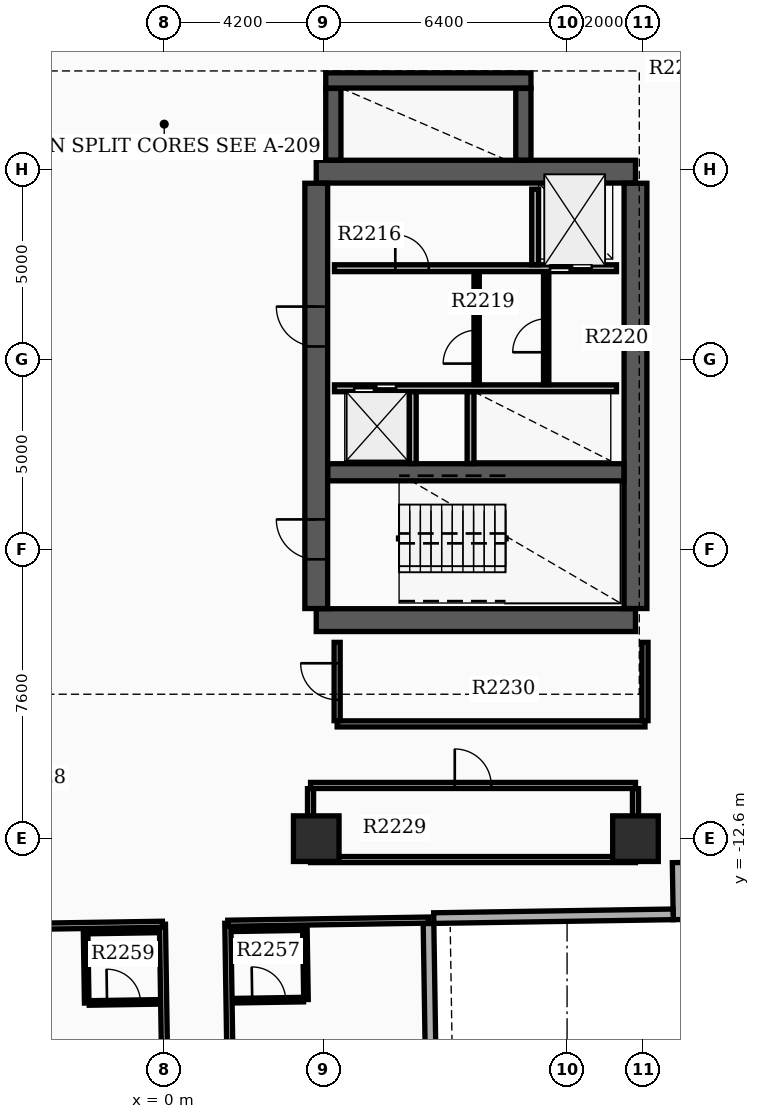
"""IFC4 building model, lengths in metres.
Left out: names, types, materials, properties, quantities, classifications, styles, units other than length and angle.
Written with IfcOpenShell. Run it as: python <this file> out.ifc"""

import sys

from ifc_helpers import new_model, si_unit, direction, frame, frame_2d, origin, origin_2d, place, context, subcontext, project, spatial, rectangle, extrude, element, fill, save


model = new_model("IFC4")
c1 = context("Model", 3, precision=1e-05, world=origin(), true_north=direction((0.0, 1.0)))
c2 = subcontext(c1, "Body", "Model", "MODEL_VIEW")
j1 = project(units=[si_unit("LENGTHUNIT", "METRE"), si_unit("PLANEANGLEUNIT", "RADIAN")], contexts=[c1])
p1 = place(None, origin())
s1 = spatial("IfcSite", under=j1, at=p1, CompositionType="ELEMENT")
p2 = place(p1, origin())
s2 = spatial("IfcBuilding", under=s1, at=p2, CompositionType="ELEMENT")
p3 = place(p2, frame((0.0, 0.0, 139.8)))
s3 = spatial("IfcBuildingStorey", under=s2, at=p3, CompositionType="ELEMENT", Elevation=139.8)
for number, where, z_axis, x_axis in (
    (1, (4.0, -6.85, 0.0), (0.0, 0.0, 1.0), (1.0, 0.0, 0.0)),
    (2, (4.0, 4.95, 0.0), (0.0, 0.0, 1.0), (1.0, 0.0, 0.0)),
):
    element("IfcWall", number, at=place(p3, frame(where, z_axis=z_axis, x_axis=x_axis)), inside=s3, PredefinedType="SHEAR", context=c2, shape_type="SweptSolid", body=[
        extrude(rectangle(XDim=8.4, YDim=0.6, at=frame_2d((4.2, 0.0))), origin(), (0.0, 0.0, 1.0), 3.65),
    ])
p4 = place(p3, frame((4.0, -6.545, 0.0), z_axis=(0.0, 0.0, 1.0), x_axis=(0.0, 1.0, 0.0)))
e3 = element("IfcWall", 3, at=p4, inside=s3, PredefinedType="SHEAR", context=c2, shape_type="SweptSolid", body=[
    extrude(rectangle(XDim=11.19, YDim=0.6, at=frame_2d((5.595, 0.0))), origin(), (0.0, 0.0, 1.0), 3.65),
])
p5 = place(p4, frame((1.295, 0.0, 0.0)))
e4 = element("IfcOpeningElement", 4, at=p5, cuts=e3, PredefinedType="OPENING", context=c2, shape_type="SweptSolid", body=[
    extrude(rectangle(XDim=1.05, YDim=2.15, at=frame_2d((0.525, 1.075))), frame((0.0, 0.31, 0.0), z_axis=(0.0, -1.0, 0.0), x_axis=(1.0, 0.0, 0.0)), (0.0, 0.0, 1.0), 0.62),
])
p6 = place(p4, frame((6.895, 0.0, 0.0)))
e5 = element("IfcOpeningElement", 5, at=p6, cuts=e3, PredefinedType="OPENING", context=c2, shape_type="SweptSolid", body=[
    extrude(rectangle(XDim=1.05, YDim=2.15, at=frame_2d((0.525, 1.075))), frame((0.0, 0.31, 0.0), z_axis=(0.0, -1.0, 0.0), x_axis=(1.0, 0.0, 0.0)), (0.0, 0.0, 1.0), 0.62),
])
p7 = place(p3, frame((12.4, -6.545, 0.0), z_axis=(0.0, 0.0, 1.0), x_axis=(0.0, 1.0, 0.0)))
e6 = element("IfcWall", 6, at=p7, inside=s3, PredefinedType="SHEAR", context=c2, shape_type="SweptSolid", body=[
    extrude(rectangle(XDim=11.19, YDim=0.6, at=frame_2d((5.595, 0.0))), origin(), (0.0, 0.0, 1.0), 3.65),
])
p8 = place(p3, frame((4.305, -2.96, 0.0), z_axis=(0.0, 0.0, 1.0), x_axis=(1.0, 0.0, 0.0)))
e7 = element("IfcWall", 7, at=p8, inside=s3, PredefinedType="SHEAR", context=c2, shape_type="SweptSolid", body=[
    extrude(rectangle(XDim=7.79, YDim=0.45, at=frame_2d((3.895, 0.0))), origin(), (0.0, 0.0, 1.0), 3.65),
])
p9 = place(p3, frame((4.45, 5.255, 0.0), z_axis=(0.0, 0.0, 1.0), x_axis=(0.0, 1.0, 0.0)))
e8 = element("IfcWall", 8, at=p9, inside=s3, PredefinedType="SHEAR", context=c2, shape_type="SweptSolid", body=[
    extrude(rectangle(XDim=1.885, YDim=0.4, at=frame_2d((0.942, 0.0))), origin(), (0.0, 0.0, 1.0), 3.65),
])
p10 = place(p3, frame((4.25, 7.35, 0.0), z_axis=(0.0, 0.0, 1.0), x_axis=(1.0, 0.0, 0.0)))
e9 = element("IfcWall", 9, at=p10, inside=s3, PredefinedType="SHEAR", context=c2, shape_type="SweptSolid", body=[
    extrude(rectangle(XDim=5.4, YDim=0.4, at=frame_2d((2.7, 0.0))), origin(), (0.0, 0.0, 1.0), 3.65),
])
p11 = place(p3, frame((9.45, 5.255, 0.0), z_axis=(0.0, 0.0, 1.0), x_axis=(0.0, 1.0, 0.0)))
e10 = element("IfcWall", 10, at=p11, inside=s3, PredefinedType="SHEAR", context=c2, shape_type="SweptSolid", body=[
    extrude(rectangle(XDim=1.885, YDim=0.4, at=frame_2d((0.942, 0.0))), origin(), (0.0, 0.0, 1.0), 3.65),
])
for number, where, z_axis, x_axis in (
    (11, (12.4, -12.6, 0.0), (0.0, 0.0, 1.0), (1.0, 0.0, 0.0)),
    (12, (4.0, -12.6, 0.0), (0.0, 0.0, 1.0), (1.0, 0.0, 0.0)),
):
    element("IfcColumn", number, at=place(p3, frame(where, z_axis=z_axis, x_axis=x_axis)), inside=s3, PredefinedType="COLUMN", context=c2, shape_type="SweptSolid", body=[
        extrude(rectangle(XDim=1.2, YDim=1.2, at=origin_2d()), origin(), (0.0, 0.0, 1.0), 3.9),
    ])
p12 = place(p3, frame((7.27, -34.93, 0.0), z_axis=(0.0, 0.0, 1.0), x_axis=(-0.015705059908, 0.999876667941, 0.0)))
e13 = element("IfcWall", 13, at=p12, inside=s3, PredefinedType="STANDARD", context=c2, shape_type="SweptSolid", body=[
    extrude(rectangle(XDim=20.1, YDim=0.28, at=frame_2d((10.05, 0.0))), origin(), (0.0, 0.0, 1.0), 2.92),
])
p13 = place(p12, frame((1.6, 0.0, 0.8)))
e14 = element("IfcOpeningElement", 14, at=p13, cuts=e13, PredefinedType="OPENING", context=c2, shape_type="SweptSolid", body=[
    extrude(rectangle(XDim=1.4, YDim=1.6, at=frame_2d((0.7, 0.8))), frame((0.0, 0.15, 0.0), z_axis=(0.0, -1.0, 0.0), x_axis=(1.0, 0.0, 0.0)), (0.0, 0.0, 1.0), 0.3),
])
p14 = place(p12, frame((4.8, 0.0, 0.8)))
e15 = element("IfcOpeningElement", 15, at=p14, cuts=e13, PredefinedType="OPENING", context=c2, shape_type="SweptSolid", body=[
    extrude(rectangle(XDim=1.4, YDim=1.6, at=frame_2d((0.7, 0.8))), frame((0.0, 0.15, 0.0), z_axis=(0.0, -1.0, 0.0), x_axis=(1.0, 0.0, 0.0)), (0.0, 0.0, 1.0), 0.3),
])
p15 = place(p12, frame((8.0, 0.0, 0.8)))
e16 = element("IfcOpeningElement", 16, at=p15, cuts=e13, PredefinedType="OPENING", context=c2, shape_type="SweptSolid", body=[
    extrude(rectangle(XDim=1.4, YDim=1.6, at=frame_2d((0.7, 0.8))), frame((0.0, 0.15, 0.0), z_axis=(0.0, -1.0, 0.0), x_axis=(1.0, 0.0, 0.0)), (0.0, 0.0, 1.0), 0.3),
])
p16 = place(p12, frame((11.2, 0.0, 0.8)))
e17 = element("IfcOpeningElement", 17, at=p16, cuts=e13, PredefinedType="OPENING", context=c2, shape_type="SweptSolid", body=[
    extrude(rectangle(XDim=1.4, YDim=1.6, at=frame_2d((0.7, 0.8))), frame((0.0, 0.15, 0.0), z_axis=(0.0, -1.0, 0.0), x_axis=(1.0, 0.0, 0.0)), (0.0, 0.0, 1.0), 0.3),
])
p17 = place(p3, frame((13.51, -13.229, 0.0), z_axis=(0.0, 0.0, 1.0), x_axis=(0.015625635615, -0.999877912303, 0.0)))
e18 = element("IfcWall", 18, at=p17, inside=s3, PredefinedType="STANDARD", context=c2, shape_type="SweptSolid", body=[
    extrude(rectangle(XDim=1.5, YDim=0.28, at=frame_2d((0.75, 0.0))), origin(), (0.0, 0.0, 1.0), 2.92),
])
p18 = place(p3, frame((13.391, -14.592, 0.0), z_axis=(0.0, 0.0, 1.0), x_axis=(-0.999876833368, -0.015694524359, 0.0)))
e19 = element("IfcWall", 19, at=p18, inside=s3, PredefinedType="STANDARD", context=c2, shape_type="SweptSolid", body=[
    extrude(rectangle(XDim=6.3, YDim=0.28, at=frame_2d((3.15, 0.0))), origin(), (0.0, 0.0, 1.0), 2.92),
])
p19 = place(p3, frame((4.48, 2.41, 0.0), z_axis=(0.0, 0.0, 1.0), x_axis=(1.0, 0.0, 0.0)))
e20 = element("IfcWall", 20, at=p19, inside=s3, PredefinedType="SOLIDWALL", context=c2, shape_type="SweptSolid", body=[
    extrude(rectangle(XDim=7.42, YDim=0.18, at=frame_2d((3.71, 0.0))), origin(), (0.0, 0.0, 1.0), 2.91),
])
p20 = place(p19, frame((5.67, 0.0, 0.0)))
e21 = element("IfcOpeningElement", 21, at=p20, cuts=e20, PredefinedType="OPENING", context=c2, shape_type="SweptSolid", body=[
    extrude(rectangle(XDim=1.1, YDim=2.15, at=frame_2d((0.55, 1.075))), frame((0.0, 0.1, 0.0), z_axis=(0.0, -1.0, 0.0), x_axis=(1.0, 0.0, 0.0)), (0.0, 0.0, 1.0), 0.2),
])
p21 = place(p19, frame((1.6, 0.0, 0.0)))
e22 = element("IfcOpeningElement", 22, at=p21, cuts=e20, PredefinedType="OPENING", context=c2, shape_type="SweptSolid", body=[
    extrude(rectangle(XDim=0.88, YDim=2.1, at=frame_2d((0.44, 1.05))), frame((0.0, 0.1, 0.0), z_axis=(0.0, -1.0, 0.0), x_axis=(1.0, 0.0, 0.0)), (0.0, 0.0, 1.0), 0.2),
])
p22 = place(p3, frame((4.48, -0.75, 0.0), z_axis=(0.0, 0.0, 1.0), x_axis=(1.0, 0.0, 0.0)))
e23 = element("IfcWall", 23, at=p22, inside=s3, PredefinedType="SOLIDWALL", context=c2, shape_type="SweptSolid", body=[
    extrude(rectangle(XDim=7.42, YDim=0.18, at=frame_2d((3.71, 0.0))), origin(), (0.0, 0.0, 1.0), 2.91),
])
p23 = place(p22, frame((0.52, 0.0, 0.0)))
e24 = element("IfcOpeningElement", 24, at=p23, cuts=e23, PredefinedType="OPENING", context=c2, shape_type="SweptSolid", body=[
    extrude(rectangle(XDim=1.1, YDim=2.15, at=frame_2d((0.55, 1.075))), frame((0.0, 0.1, 0.0), z_axis=(0.0, -1.0, 0.0), x_axis=(1.0, 0.0, 0.0)), (0.0, 0.0, 1.0), 0.2),
])
p24 = place(p3, frame((9.76, 2.5, 0.0), z_axis=(0.0, 0.0, 1.0), x_axis=(0.0, 1.0, 0.0)))
e25 = element("IfcWall", 25, at=p24, inside=s3, PredefinedType="SOLIDWALL", context=c2, shape_type="SweptSolid", body=[
    extrude(rectangle(XDim=1.99, YDim=0.18, at=frame_2d((0.995, 0.0))), origin(), (0.0, 0.0, 1.0), 2.91),
])
for number, where, z_axis, x_axis in (
    (26, (6.54, -2.73, 0.0), (0.0, 0.0, 1.0), (0.0, 1.0, 0.0)),
    (27, (8.06, -2.73, 0.0), (0.0, 0.0, 1.0), (0.0, 1.0, 0.0)),
):
    element("IfcWall", number, at=place(p3, frame(where, z_axis=z_axis, x_axis=x_axis)), inside=s3, PredefinedType="SOLIDWALL", context=c2, shape_type="SweptSolid", body=[
        extrude(rectangle(XDim=1.89, YDim=0.18, at=frame_2d((0.945, 0.0))), origin(), (0.0, 0.0, 1.0), 2.91),
    ])
p25 = place(p3, frame((8.22, -0.65, 0.0), z_axis=(0.0, 0.0, 1.0), x_axis=(0.0, 1.0, 0.0)))
e28 = element("IfcWall", 28, at=p25, inside=s3, PredefinedType="SOLIDWALL", context=c2, shape_type="SweptSolid", body=[
    extrude(rectangle(XDim=2.96, YDim=0.14, at=frame_2d((1.48, 0.0))), origin(), (0.0, 0.0, 1.0), 2.91),
])
p26 = place(p25, frame((0.55, 0.0, 0.0)))
e29 = element("IfcOpeningElement", 29, at=p26, cuts=e28, PredefinedType="OPENING", context=c2, shape_type="SweptSolid", body=[
    extrude(rectangle(XDim=0.88, YDim=2.1, at=frame_2d((0.44, 1.05))), frame((0.0, 0.08, 0.0), z_axis=(0.0, -1.0, 0.0), x_axis=(1.0, 0.0, 0.0)), (0.0, 0.0, 1.0), 0.16),
])
p27 = place(p3, frame((10.05, -0.652, 0.0), z_axis=(0.0, 0.0, 1.0), x_axis=(0.0, 1.0, 0.0)))
e30 = element("IfcWall", 30, at=p27, inside=s3, PredefinedType="PARTITIONING", context=c2, shape_type="SweptSolid", body=[
    extrude(rectangle(XDim=2.962, YDim=0.14, at=frame_2d((1.481, 0.0))), origin(), (0.0, 0.0, 1.0), 2.91),
])
p28 = place(p27, frame((0.85, 0.0, 0.0)))
e31 = element("IfcOpeningElement", 31, at=p28, cuts=e30, PredefinedType="OPENING", context=c2, shape_type="SweptSolid", body=[
    extrude(rectangle(XDim=0.88, YDim=2.1, at=frame_2d((0.44, 1.05))), frame((0.0, 0.08, 0.0), z_axis=(0.0, -1.0, 0.0), x_axis=(1.0, 0.0, 0.0)), (0.0, 0.0, 1.0), 0.16),
])
p29 = place(p3, frame((3.85, -13.15, 0.0), z_axis=(0.0, 0.0, 1.0), x_axis=(1.0, 0.0, 0.0)))
e32 = element("IfcWall", 32, at=p29, inside=s3, PredefinedType="PARTITIONING", context=c2, shape_type="SweptSolid", body=[
    extrude(rectangle(XDim=8.55, YDim=0.16, at=frame_2d((4.275, 0.0))), origin(), (0.0, 0.0, 1.0), 2.91),
])
p30 = place(p3, frame((3.85, -11.2, 0.0), z_axis=(0.0, 0.0, 1.0), x_axis=(1.0, 0.0, 0.0)))
e33 = element("IfcWall", 33, at=p30, inside=s3, PredefinedType="PARTITIONING", context=c2, shape_type="SweptSolid", body=[
    extrude(rectangle(XDim=8.55, YDim=0.16, at=frame_2d((4.275, 0.0))), origin(), (0.0, 0.0, 1.0), 2.91),
])
p31 = place(p30, frame((3.795, 0.0, 0.0)))
e34 = element("IfcOpeningElement", 34, at=p31, cuts=e33, PredefinedType="OPENING", context=c2, shape_type="SweptSolid", body=[
    extrude(rectangle(XDim=0.96, YDim=2.15, at=frame_2d((0.48, 1.075))), frame((0.0, 0.09, 0.0), z_axis=(0.0, -1.0, 0.0), x_axis=(1.0, 0.0, 0.0)), (0.0, 0.0, 1.0), 0.18),
])
for number, where, z_axis, x_axis in (
    (35, (3.85, -13.065, 0.0), (0.0, 0.0, 1.0), (0.0, 1.0, 0.0)),
    (36, (12.4, -13.065, 0.0), (0.0, 0.0, 1.0), (0.0, 1.0, 0.0)),
):
    element("IfcWall", number, at=place(p3, frame(where, z_axis=z_axis, x_axis=x_axis)), inside=s3, PredefinedType="PARTITIONING", context=c2, shape_type="SweptSolid", body=[
        extrude(rectangle(XDim=1.78, YDim=0.16, at=frame_2d((0.89, 0.0))), origin(), (0.0, 0.0, 1.0), 2.91),
    ])
p32 = place(p3, frame((4.55, -9.58, 0.0), z_axis=(0.0, 0.0, 1.0), x_axis=(1.0, 0.0, 0.0)))
e37 = element("IfcWall", 37, at=p32, inside=s3, PredefinedType="PARTITIONING", context=c2, shape_type="SweptSolid", body=[
    extrude(rectangle(XDim=8.1, YDim=0.16, at=frame_2d((4.05, 0.0))), origin(), (0.0, 0.0, 1.0), 2.91),
])
p33 = place(p3, frame((4.55, -9.495, 0.0), z_axis=(0.0, 0.0, 1.0), x_axis=(0.0, 1.0, 0.0)))
e38 = element("IfcWall", 38, at=p33, inside=s3, PredefinedType="PARTITIONING", context=c2, shape_type="SweptSolid", body=[
    extrude(rectangle(XDim=2.06, YDim=0.16, at=frame_2d((1.03, 0.0))), origin(), (0.0, 0.0, 1.0), 2.91),
])
p34 = place(p33, frame((0.55, 0.0, 0.0)))
e39 = element("IfcOpeningElement", 39, at=p34, cuts=e38, PredefinedType="OPENING", context=c2, shape_type="SweptSolid", body=[
    extrude(rectangle(XDim=0.96, YDim=2.15, at=frame_2d((0.48, 1.075))), frame((0.0, 0.09, 0.0), z_axis=(0.0, -1.0, 0.0), x_axis=(1.0, 0.0, 0.0)), (0.0, 0.0, 1.0), 0.18),
])
p35 = place(p3, frame((12.65, -9.495, 0.0), z_axis=(0.0, 0.0, 1.0), x_axis=(0.0, 1.0, 0.0)))
e40 = element("IfcWall", 40, at=p35, inside=s3, PredefinedType="PARTITIONING", context=c2, shape_type="SweptSolid", body=[
    extrude(rectangle(XDim=2.06, YDim=0.16, at=frame_2d((1.03, 0.0))), origin(), (0.0, 0.0, 1.0), 2.91),
])
p36 = place(p3, frame((1.673, -14.825, 0.0), z_axis=(0.0, 0.0, 1.0), x_axis=(0.015701893165, -0.999876717676, 0.0)))
e41 = element("IfcWall", 41, at=p36, inside=s3, PredefinedType="PARTITIONING", context=c2, shape_type="SweptSolid", body=[
    extrude(rectangle(XDim=20.182, YDim=0.16, at=frame_2d((10.091, 0.0))), origin(), (0.0, 0.0, 1.0), 2.91),
])
p37 = place(p36, frame((18.93, 0.0, 0.0)))
e42 = element("IfcOpeningElement", 42, at=p37, cuts=e41, PredefinedType="OPENING", context=c2, shape_type="SweptSolid", body=[
    extrude(rectangle(XDim=0.96, YDim=2.15, at=frame_2d((0.48, 1.075))), frame((0.0, 0.09, 0.0), z_axis=(0.0, -1.0, 0.0), x_axis=(1.0, 0.0, 0.0)), (0.0, 0.0, 1.0), 0.18),
])
p38 = place(p3, frame((1.673, -14.825, 0.0), z_axis=(0.0, 0.0, 1.0), x_axis=(0.999877138082, 0.015675099418, 0.0)))
e43 = element("IfcWall", 43, at=p38, inside=s3, PredefinedType="PARTITIONING", context=c2, shape_type="SweptSolid", body=[
    extrude(rectangle(XDim=5.28, YDim=0.16, at=frame_2d((2.64, 0.0))), origin(), (0.0, 0.0, 1.0), 2.91),
])
p39 = place(p3, frame((1.845, -16.863, 0.0), z_axis=(0.0, 0.0, 1.0), x_axis=(0.999876803258, 0.015696442504, 0.0)))
e44 = element("IfcWall", 44, at=p39, inside=s3, PredefinedType="PARTITIONING", context=c2, shape_type="SweptSolid", body=[
    extrude(rectangle(XDim=1.82, YDim=0.12, at=frame_2d((0.91, 0.0))), origin(), (0.0, 0.0, 1.0), 2.91),
])
p40 = place(p39, frame((0.47, 0.0, 0.0)))
e45 = element("IfcOpeningElement", 45, at=p40, cuts=e44, PredefinedType="OPENING", context=c2, shape_type="SweptSolid", body=[
    extrude(rectangle(XDim=0.88, YDim=2.1, at=frame_2d((0.44, 1.05))), frame((0.0, 0.07, 0.0), z_axis=(0.0, -1.0, 0.0), x_axis=(1.0, 0.0, 0.0)), (0.0, 0.0, 1.0), 0.14),
])
p41 = place(p3, frame((1.816, -14.983, 0.0), z_axis=(0.0, 0.0, 1.0), x_axis=(0.999874688728, 0.015830566654, 0.0)))
e46 = element("IfcWall", 46, at=p41, inside=s3, PredefinedType="PARTITIONING", context=c2, shape_type="SweptSolid", body=[
    extrude(rectangle(XDim=1.82, YDim=0.12, at=frame_2d((0.91, 0.0))), origin(), (0.0, 0.0, 1.0), 2.91),
])
p42 = place(p3, frame((3.7, -14.954, 0.0), z_axis=(0.0, 0.0, 1.0), x_axis=(0.015842167482, -0.99987450499, 0.0)))
e47 = element("IfcWall", 47, at=p42, inside=s3, PredefinedType="PARTITIONING", context=c2, shape_type="SweptSolid", body=[
    extrude(rectangle(XDim=1.88, YDim=0.12, at=frame_2d((0.94, 0.0))), origin(), (0.0, 0.0, 1.0), 2.91),
])
p43 = place(p3, frame((-0.047, -14.853, 0.0), z_axis=(0.0, 0.0, 1.0), x_axis=(0.015701893165, -0.999876717676, 0.0)))
e48 = element("IfcWall", 48, at=p43, inside=s3, PredefinedType="PARTITIONING", context=c2, shape_type="SweptSolid", body=[
    extrude(rectangle(XDim=20.182, YDim=0.16, at=frame_2d((10.091, 0.0))), origin(), (0.0, 0.0, 1.0), 2.91),
])
p44 = place(p43, frame((18.93, 0.0, 0.0)))
e49 = element("IfcOpeningElement", 49, at=p44, cuts=e48, PredefinedType="OPENING", context=c2, shape_type="SweptSolid", body=[
    extrude(rectangle(XDim=0.96, YDim=2.15, at=frame_2d((0.48, 1.075))), frame((0.0, 0.09, 0.0), z_axis=(0.0, -1.0, 0.0), x_axis=(1.0, 0.0, 0.0)), (0.0, 0.0, 1.0), 0.18),
])
p45 = place(p3, frame((-0.047, -14.853, 0.0), z_axis=(0.0, 0.0, 1.0), x_axis=(-0.99987682984, -0.015694749102, 0.0)))
e50 = element("IfcWall", 50, at=p45, inside=s3, PredefinedType="PARTITIONING", context=c2, shape_type="SweptSolid", body=[
    extrude(rectangle(XDim=6.44, YDim=0.16, at=frame_2d((3.22, 0.0))), origin(), (0.0, 0.0, 1.0), 2.91),
])
p46 = place(p3, frame((-1.974, -16.923, 0.0), z_axis=(0.0, 0.0, 1.0), x_axis=(0.999876803258, 0.015696442504, 0.0)))
e51 = element("IfcWall", 51, at=p46, inside=s3, PredefinedType="PARTITIONING", context=c2, shape_type="SweptSolid", body=[
    extrude(rectangle(XDim=1.82, YDim=0.12, at=frame_2d((0.91, 0.0))), origin(), (0.0, 0.0, 1.0), 2.91),
])
p47 = place(p46, frame((0.47, 0.0, 0.0)))
e52 = element("IfcOpeningElement", 52, at=p47, cuts=e51, PredefinedType="OPENING", context=c2, shape_type="SweptSolid", body=[
    extrude(rectangle(XDim=0.88, YDim=2.1, at=frame_2d((0.44, 1.05))), frame((0.0, 0.07, 0.0), z_axis=(0.0, -1.0, 0.0), x_axis=(1.0, 0.0, 0.0)), (0.0, 0.0, 1.0), 0.14),
])
p48 = place(p3, frame((-2.004, -15.043, 0.0), z_axis=(0.0, 0.0, 1.0), x_axis=(0.999876836305, 0.015694337248, 0.0)))
e53 = element("IfcWall", 53, at=p48, inside=s3, PredefinedType="PARTITIONING", context=c2, shape_type="SweptSolid", body=[
    extrude(rectangle(XDim=1.82, YDim=0.12, at=frame_2d((0.91, 0.0))), origin(), (0.0, 0.0, 1.0), 2.91),
])
p49 = place(p3, frame((-2.069, -15.044, 0.0), z_axis=(0.0, 0.0, 1.0), x_axis=(0.015714386166, -0.99987652141, 0.0)))
e54 = element("IfcWall", 54, at=p49, inside=s3, PredefinedType="PARTITIONING", context=c2, shape_type="SweptSolid", body=[
    extrude(rectangle(XDim=1.88, YDim=0.12, at=frame_2d((0.94, 0.0))), origin(), (0.0, 0.0, 1.0), 2.91),
])
p50 = place(p5, origin())
e55 = element("IfcDoor", 55, at=p50, inside=s3, OperationType="SINGLE_SWING_RIGHT", PredefinedType="DOOR", context=c2, shape_type="SweptSolid", body=[
    extrude(rectangle(XDim=1.05, YDim=2.15, at=frame_2d((0.525, 1.075))), frame((0.0, 0.025, 0.0), z_axis=(0.0, -1.0, 0.0), x_axis=(1.0, 0.0, 0.0)), (0.0, 0.0, 1.0), 0.05),
])
fill(e4, e55)
p51 = place(p6, origin())
e56 = element("IfcDoor", 56, at=p51, inside=s3, OperationType="SINGLE_SWING_RIGHT", PredefinedType="DOOR", context=c2, shape_type="SweptSolid", body=[
    extrude(rectangle(XDim=1.05, YDim=2.15, at=frame_2d((0.525, 1.075))), frame((0.0, 0.025, 0.0), z_axis=(0.0, -1.0, 0.0), x_axis=(1.0, 0.0, 0.0)), (0.0, 0.0, 1.0), 0.05),
])
fill(e5, e56)
p52 = place(p20, origin())
e57 = element("IfcDoor", 57, at=p52, inside=s3, OperationType="DOUBLE_DOOR_SLIDING", PredefinedType="DOOR", context=c2, shape_type="SweptSolid", body=[
    extrude(rectangle(XDim=1.1, YDim=2.15, at=frame_2d((0.55, 1.075))), frame((0.0, 0.025, 0.0), z_axis=(0.0, -1.0, 0.0), x_axis=(1.0, 0.0, 0.0)), (0.0, 0.0, 1.0), 0.05),
])
fill(e21, e57)
p53 = place(p23, origin())
e58 = element("IfcDoor", 58, at=p53, inside=s3, OperationType="DOUBLE_DOOR_SLIDING", PredefinedType="DOOR", context=c2, shape_type="SweptSolid", body=[
    extrude(rectangle(XDim=1.1, YDim=2.15, at=frame_2d((0.55, 1.075))), frame((0.0, 0.025, 0.0), z_axis=(0.0, -1.0, 0.0), x_axis=(1.0, 0.0, 0.0)), (0.0, 0.0, 1.0), 0.05),
])
fill(e24, e58)
p54 = place(p21, origin())
e59 = element("IfcDoor", 59, at=p54, inside=s3, OperationType="SINGLE_SWING_LEFT", PredefinedType="DOOR", context=c2, shape_type="SweptSolid", body=[
    extrude(rectangle(XDim=0.88, YDim=2.1, at=frame_2d((0.44, 1.05))), frame((0.0, 0.025, 0.0), z_axis=(0.0, -1.0, 0.0), x_axis=(1.0, 0.0, 0.0)), (0.0, 0.0, 1.0), 0.05),
])
fill(e22, e59)
p55 = place(p26, origin())
e60 = element("IfcDoor", 60, at=p55, inside=s3, OperationType="SINGLE_SWING_LEFT", PredefinedType="DOOR", context=c2, shape_type="SweptSolid", body=[
    extrude(rectangle(XDim=0.88, YDim=2.1, at=frame_2d((0.44, 1.05))), frame((0.0, 0.025, 0.0), z_axis=(0.0, -1.0, 0.0), x_axis=(1.0, 0.0, 0.0)), (0.0, 0.0, 1.0), 0.05),
])
fill(e29, e60)
p56 = place(p28, origin())
e61 = element("IfcDoor", 61, at=p56, inside=s3, OperationType="SINGLE_SWING_LEFT", PredefinedType="DOOR", context=c2, shape_type="SweptSolid", body=[
    extrude(rectangle(XDim=0.88, YDim=2.1, at=frame_2d((0.44, 1.05))), frame((0.0, 0.025, 0.0), z_axis=(0.0, -1.0, 0.0), x_axis=(1.0, 0.0, 0.0)), (0.0, 0.0, 1.0), 0.05),
])
fill(e31, e61)
p57 = place(p31, origin())
e62 = element("IfcDoor", 62, at=p57, inside=s3, OperationType="SINGLE_SWING_LEFT", PredefinedType="DOOR", context=c2, shape_type="SweptSolid", body=[
    extrude(rectangle(XDim=0.96, YDim=2.15, at=frame_2d((0.48, 1.075))), frame((0.0, 0.025, 0.0), z_axis=(0.0, -1.0, 0.0), x_axis=(1.0, 0.0, 0.0)), (0.0, 0.0, 1.0), 0.05),
])
fill(e34, e62)
p58 = place(p34, origin())
e63 = element("IfcDoor", 63, at=p58, inside=s3, OperationType="SINGLE_SWING_RIGHT", PredefinedType="DOOR", context=c2, shape_type="SweptSolid", body=[
    extrude(rectangle(XDim=0.96, YDim=2.15, at=frame_2d((0.48, 1.075))), frame((0.0, 0.025, 0.0), z_axis=(0.0, -1.0, 0.0), x_axis=(1.0, 0.0, 0.0)), (0.0, 0.0, 1.0), 0.05),
])
fill(e39, e63)
p59 = place(p40, origin())
e64 = element("IfcDoor", 64, at=p59, inside=s3, OperationType="SINGLE_SWING_LEFT", PredefinedType="DOOR", context=c2, shape_type="SweptSolid", body=[
    extrude(rectangle(XDim=0.88, YDim=2.1, at=frame_2d((0.44, 1.05))), frame((0.0, 0.025, 0.0), z_axis=(0.0, -1.0, 0.0), x_axis=(1.0, 0.0, 0.0)), (0.0, 0.0, 1.0), 0.05),
])
fill(e45, e64)
p60 = place(p47, origin())
e65 = element("IfcDoor", 65, at=p60, inside=s3, OperationType="SINGLE_SWING_LEFT", PredefinedType="DOOR", context=c2, shape_type="SweptSolid", body=[
    extrude(rectangle(XDim=0.88, YDim=2.1, at=frame_2d((0.44, 1.05))), frame((0.0, 0.025, 0.0), z_axis=(0.0, -1.0, 0.0), x_axis=(1.0, 0.0, 0.0)), (0.0, 0.0, 1.0), 0.05),
])
fill(e52, e65)
save(model, sys.argv[1])
